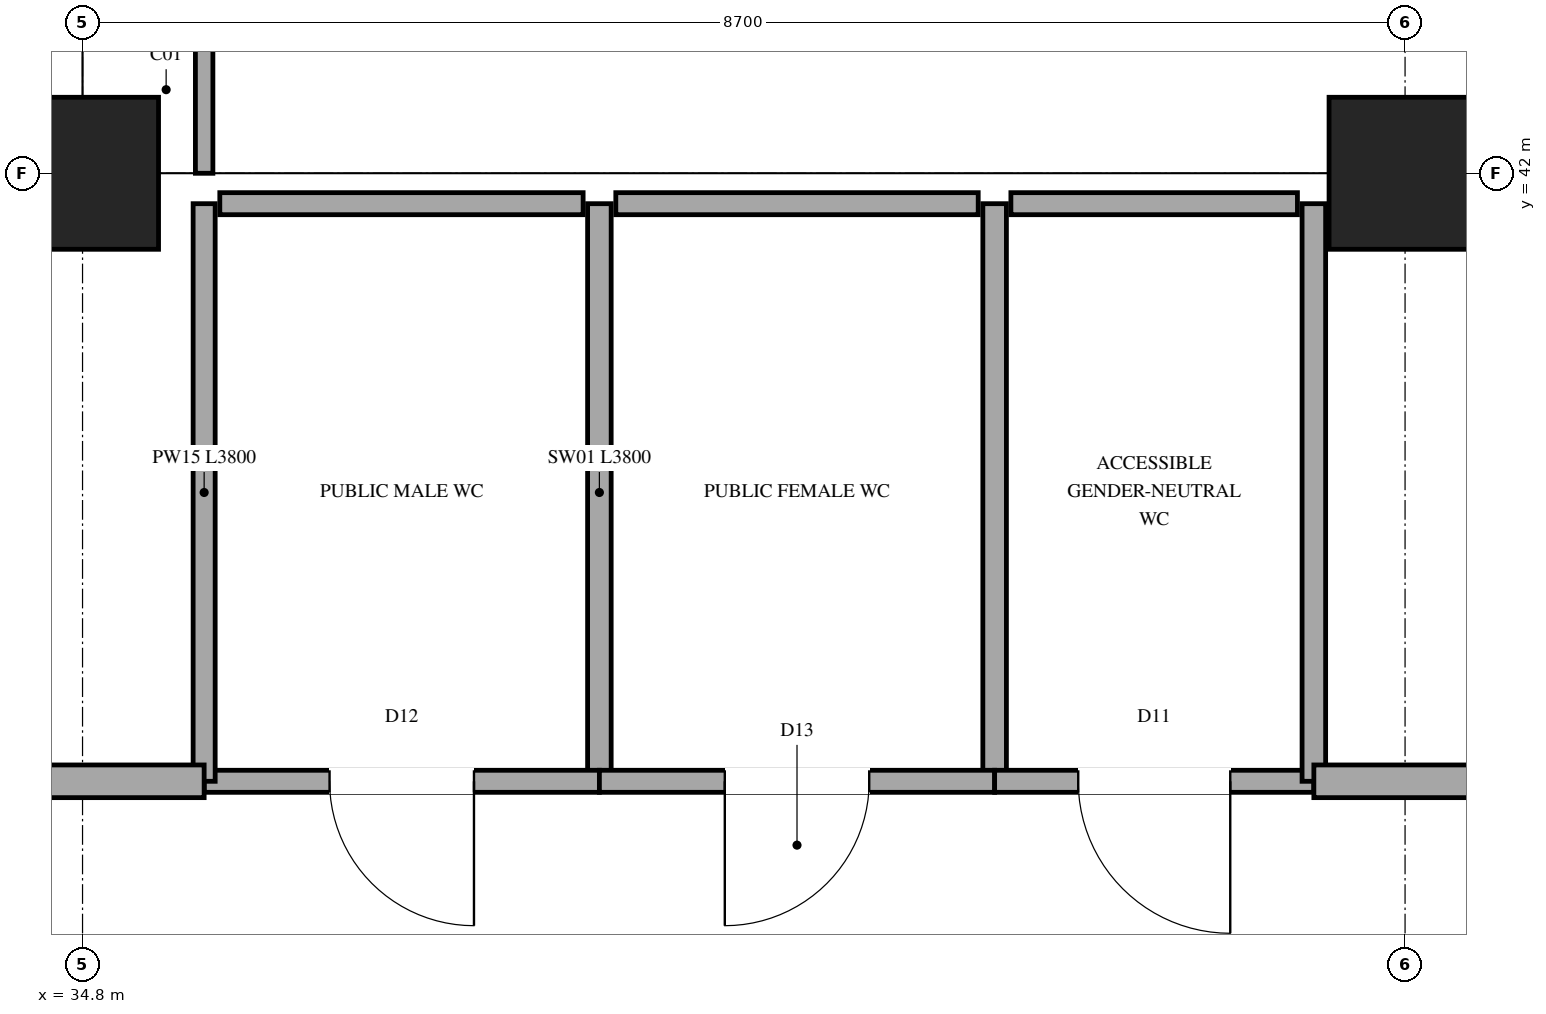
"""IFC4 building model, lengths in metres.
Left out: names, types, materials, properties, quantities, classifications, styles, units other than length and angle.
Written with IfcOpenShell. Run it as: python <this file> out.ifc"""

import sys

from ifc_helpers import new_model, si_unit, direction, frame, frame_2d, origin, origin_2d, place, context, subcontext, project, spatial, rectangle, extrude, element, fill, save


model = new_model("IFC4")
c1 = context("Model", 3, precision=1e-05, world=origin(), true_north=direction((0.0, 1.0)))
c2 = subcontext(c1, "Body", "Model", "MODEL_VIEW")
j1 = project(units=[si_unit("LENGTHUNIT", "METRE"), si_unit("PLANEANGLEUNIT", "RADIAN")], contexts=[c1])
p1 = place(None, origin())
s1 = spatial("IfcSite", under=j1, at=p1, CompositionType="ELEMENT")
p2 = place(p1, origin())
s2 = spatial("IfcBuilding", under=s1, at=p2, CompositionType="ELEMENT")
p3 = place(p2, origin())
s3 = spatial("IfcBuildingStorey", under=s2, at=p3, CompositionType="ELEMENT", Elevation=0.0)
for number, where, z_axis, x_axis in (
    (1, (34.8, 42.0, 0.0), (0.0, 0.0, 1.0), (1.0, 0.0, 0.0)),
    (2, (43.5, 42.0, 0.0), (0.0, 0.0, 1.0), (1.0, 0.0, 0.0)),
):
    element("IfcColumn", number, at=place(p3, frame(where, z_axis=z_axis, x_axis=x_axis)), inside=s3, PredefinedType="COLUMN", context=c2, shape_type="SweptSolid", body=[
        extrude(rectangle(XDim=1.0, YDim=1.0, at=origin_2d()), origin(), (0.0, 0.0, 1.0), 6.0),
    ])
p4 = place(p3, frame((38.2, 41.8, 0.0), z_axis=(0.0, 0.0, 1.0), x_axis=(0.0, -1.0, 0.0)))
e3 = element("IfcWall", 3, at=p4, inside=s3, PredefinedType="MOVABLE", context=c2, shape_type="SweptSolid", body=[
    extrude(rectangle(XDim=3.8, YDim=0.155, at=frame_2d((1.9, 0.0))), origin(), (0.0, 0.0, 1.0), 4.91),
])
p5 = place(p3, frame((38.2, 38.0, 0.0), z_axis=(0.0, 0.0, 1.0), x_axis=(-1.0, 0.0, 0.0)))
e4 = element("IfcWall", 4, at=p5, inside=s3, PredefinedType="PARTITIONING", context=c2, shape_type="SweptSolid", body=[
    extrude(rectangle(XDim=2.6, YDim=0.145, at=frame_2d((1.3, 0.0))), origin(), (0.0, 0.0, 1.0), 5.66),
])
p6 = place(p5, frame((0.825, 0.0, 0.0)))
e5 = element("IfcOpeningElement", 5, at=p6, cuts=e4, PredefinedType="OPENING", context=c2, shape_type="SweptSolid", body=[
    extrude(rectangle(XDim=0.95, YDim=2.15, at=frame_2d((0.475, 1.075))), frame((0.0, 0.083, 0.0), z_axis=(0.0, -1.0, 0.0), x_axis=(1.0, 0.0, 0.0)), (0.0, 0.0, 1.0), 0.165),
])
p7 = place(p3, frame((35.6, 38.0, 0.0), z_axis=(0.0, 0.0, 1.0), x_axis=(0.0, 1.0, 0.0)))
e6 = element("IfcWall", 6, at=p7, inside=s3, PredefinedType="PARTITIONING", context=c2, shape_type="SweptSolid", body=[
    extrude(rectangle(XDim=3.8, YDim=0.145, at=frame_2d((1.9, 0.0))), origin(), (0.0, 0.0, 1.0), 4.91),
])
p8 = place(p3, frame((40.8, 41.8, 0.0), z_axis=(0.0, 0.0, 1.0), x_axis=(0.0, -1.0, 0.0)))
e7 = element("IfcWall", 7, at=p8, inside=s3, PredefinedType="MOVABLE", context=c2, shape_type="SweptSolid", body=[
    extrude(rectangle(XDim=3.8, YDim=0.155, at=frame_2d((1.9, 0.0))), origin(), (0.0, 0.0, 1.0), 4.91),
])
p9 = place(p3, frame((40.8, 38.0, 0.0), z_axis=(0.0, 0.0, 1.0), x_axis=(-1.0, 0.0, 0.0)))
e8 = element("IfcWall", 8, at=p9, inside=s3, PredefinedType="PARTITIONING", context=c2, shape_type="SweptSolid", body=[
    extrude(rectangle(XDim=2.6, YDim=0.145, at=frame_2d((1.3, 0.0))), origin(), (0.0, 0.0, 1.0), 5.66),
])
p10 = place(p9, frame((0.825, 0.0, 0.0)))
e9 = element("IfcOpeningElement", 9, at=p10, cuts=e8, PredefinedType="OPENING", context=c2, shape_type="SweptSolid", body=[
    extrude(rectangle(XDim=0.95, YDim=2.2, at=frame_2d((0.475, 1.1))), frame((0.0, 0.083, 0.0), z_axis=(0.0, -1.0, 0.0), x_axis=(1.0, 0.0, 0.0)), (0.0, 0.0, 1.0), 0.165),
])
p11 = place(p3, frame((42.9, 38.0, 0.0), z_axis=(0.0, 0.0, 1.0), x_axis=(-1.0, 0.0, 0.0)))
e10 = element("IfcWall", 10, at=p11, inside=s3, PredefinedType="PARTITIONING", context=c2, shape_type="SweptSolid", body=[
    extrude(rectangle(XDim=2.1, YDim=0.145, at=frame_2d((1.05, 0.0))), origin(), (0.0, 0.0, 1.0), 5.66),
])
p12 = place(p11, frame((0.55, 0.0, 0.0)))
e11 = element("IfcOpeningElement", 11, at=p12, cuts=e10, PredefinedType="OPENING", context=c2, shape_type="SweptSolid", body=[
    extrude(rectangle(XDim=1.0, YDim=2.15, at=frame_2d((0.5, 1.075))), frame((0.0, 0.083, 0.0), z_axis=(0.0, -1.0, 0.0), x_axis=(1.0, 0.0, 0.0)), (0.0, 0.0, 1.0), 0.165),
])
p13 = place(p3, frame((42.9, 41.8, 0.0), z_axis=(0.0, 0.0, 1.0), x_axis=(0.0, -1.0, 0.0)))
e12 = element("IfcWall", 12, at=p13, inside=s3, PredefinedType="MOVABLE", context=c2, shape_type="SweptSolid", body=[
    extrude(rectangle(XDim=3.8, YDim=0.155, at=frame_2d((1.9, 0.0))), origin(), (0.0, 0.0, 1.0), 5.66),
])
p14 = place(p3, frame((16.66, 38.0, 0.0), z_axis=(0.0, 0.0, 1.0), x_axis=(1.0, 0.0, 0.0)))
e13 = element("IfcWall", 13, at=p14, inside=s3, PredefinedType="PARTITIONING", context=c2, shape_type="SweptSolid", body=[
    extrude(rectangle(XDim=18.94, YDim=0.215, at=frame_2d((9.47, 0.0))), origin(), (0.0, 0.0, 1.0), 4.91),
])
p15 = place(p14, frame((8.795, 0.0, 0.0)))
e14 = element("IfcOpeningElement", 14, at=p15, cuts=e13, PredefinedType="OPENING", context=c2, shape_type="SweptSolid", body=[
    extrude(rectangle(XDim=1.35, YDim=2.2, at=frame_2d((0.675, 1.1))), frame((0.0, 0.118, 0.0), z_axis=(0.0, -1.0, 0.0), x_axis=(1.0, 0.0, 0.0)), (0.0, 0.0, 1.0), 0.235),
])
p16 = place(p3, frame((42.9, 38.0, 0.0), z_axis=(0.0, 0.0, 1.0), x_axis=(1.0, 0.0, 0.0)))
e15 = element("IfcWall", 15, at=p16, inside=s3, PredefinedType="PARTITIONING", context=c2, shape_type="SweptSolid", body=[
    extrude(rectangle(XDim=13.9, YDim=0.215, at=frame_2d((6.95, 0.0))), origin(), (0.0, 0.0, 1.0), 4.91),
])
p17 = place(p16, frame((6.275, 0.0, 0.0)))
e16 = element("IfcOpeningElement", 16, at=p17, cuts=e15, PredefinedType="OPENING", context=c2, shape_type="SweptSolid", body=[
    extrude(rectangle(XDim=1.35, YDim=2.2, at=frame_2d((0.675, 1.1))), frame((0.0, 0.118, 0.0), z_axis=(0.0, -1.0, 0.0), x_axis=(1.0, 0.0, 0.0)), (0.0, 0.0, 1.0), 0.235),
])
p18 = place(p3, frame((35.6, 50.0, 0.0), z_axis=(0.0, 0.0, 1.0), x_axis=(0.0, -1.0, 0.0)))
e17 = element("IfcWall", 17, at=p18, inside=s3, PredefinedType="PARTITIONING", context=c2, shape_type="SweptSolid", body=[
    extrude(rectangle(XDim=8.0, YDim=0.115, at=frame_2d((4.0, 0.0))), origin(), (0.0, 0.0, 1.0), 4.91),
])
p19 = place(p3, frame((35.703, 41.8, 0.0), z_axis=(0.0, 0.0, 1.0), x_axis=(1.0, 0.0, 0.0)))
e18 = element("IfcWall", 18, at=p19, inside=s3, PredefinedType="PARTITIONING", context=c2, shape_type="SweptSolid", body=[
    extrude(rectangle(XDim=2.39, YDim=0.145, at=frame_2d((1.195, 0.0))), origin(), (0.0, 0.0, 1.0), 4.91),
])
p20 = place(p3, frame((38.308, 41.8, 0.0), z_axis=(0.0, 0.0, 1.0), x_axis=(1.0, 0.0, 0.0)))
e19 = element("IfcWall", 19, at=p20, inside=s3, PredefinedType="PARTITIONING", context=c2, shape_type="SweptSolid", body=[
    extrude(rectangle(XDim=2.384, YDim=0.145, at=frame_2d((1.192, 0.0))), origin(), (0.0, 0.0, 1.0), 4.91),
])
p21 = place(p3, frame((40.907, 41.8, 0.0), z_axis=(0.0, 0.0, 1.0), x_axis=(1.0, 0.0, 0.0)))
e20 = element("IfcWall", 20, at=p21, inside=s3, PredefinedType="PARTITIONING", context=c2, shape_type="SweptSolid", body=[
    extrude(rectangle(XDim=1.885, YDim=0.145, at=frame_2d((0.942, 0.0))), origin(), (0.0, 0.0, 1.0), 4.91),
])
p22 = place(p6, origin())
e21 = element("IfcDoor", 21, at=p22, inside=s3, OperationType="SINGLE_SWING_LEFT", PredefinedType="DOOR", context=c2, shape_type="SweptSolid", body=[
    extrude(rectangle(XDim=0.95, YDim=2.15, at=frame_2d((0.475, 1.075))), frame((0.0, 0.025, 0.0), z_axis=(0.0, -1.0, 0.0), x_axis=(1.0, 0.0, 0.0)), (0.0, 0.0, 1.0), 0.05),
])
fill(e5, e21)
p23 = place(p10, origin())
e22 = element("IfcDoor", 22, at=p23, inside=s3, OperationType="SINGLE_SWING_RIGHT", PredefinedType="DOOR", context=c2, shape_type="SweptSolid", body=[
    extrude(rectangle(XDim=0.95, YDim=2.2, at=frame_2d((0.475, 1.1))), frame((0.0, 0.025, 0.0), z_axis=(0.0, -1.0, 0.0), x_axis=(1.0, 0.0, 0.0)), (0.0, 0.0, 1.0), 0.05),
])
fill(e9, e22)
p24 = place(p12, origin())
e23 = element("IfcDoor", 23, at=p24, inside=s3, OperationType="SINGLE_SWING_LEFT", PredefinedType="DOOR", context=c2, shape_type="SweptSolid", body=[
    extrude(rectangle(XDim=1.0, YDim=2.15, at=frame_2d((0.5, 1.075))), frame((0.0, 0.025, 0.0), z_axis=(0.0, -1.0, 0.0), x_axis=(1.0, 0.0, 0.0)), (0.0, 0.0, 1.0), 0.05),
])
fill(e11, e23)
save(model, sys.argv[1])
